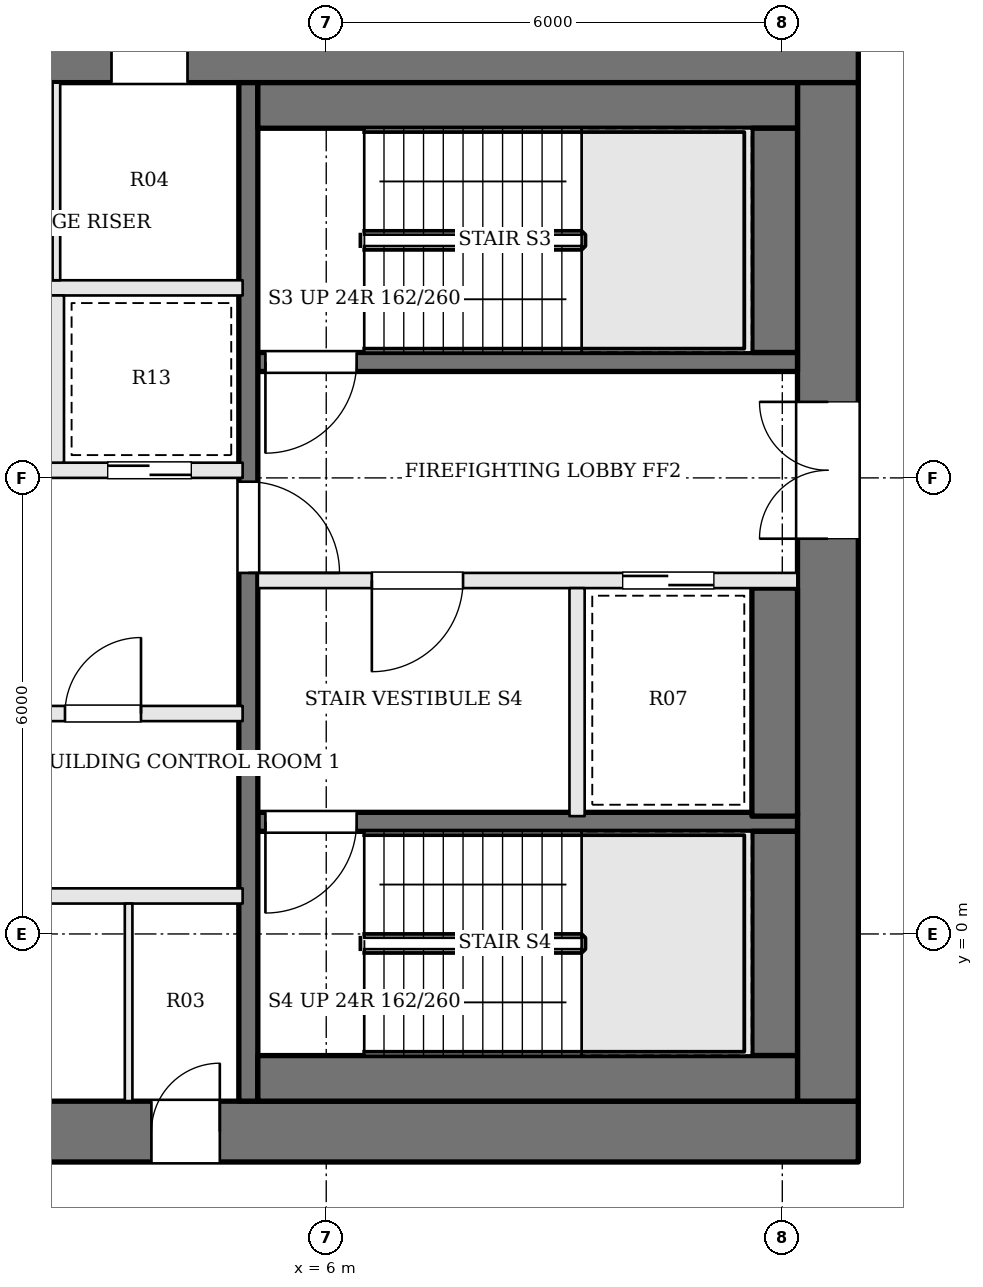
"""IFC4 building model, lengths in metres.
Left out: names, types, materials, properties, quantities, classifications, styles, units other than length and angle.
Written with IfcOpenShell. Run it as: python <this file> out.ifc"""

import sys

from ifc_helpers import new_model, si_unit, direction, frame, frame_2d, origin, place, context, subcontext, project, spatial, rectangle, extrude, element, fill, save


model = new_model("IFC4")
c1 = context("Model", 3, precision=1e-05, world=origin(), true_north=direction((0.0, 1.0)))
c2 = subcontext(c1, "Body", "Model", "MODEL_VIEW")
j1 = project(units=[si_unit("LENGTHUNIT", "METRE"), si_unit("PLANEANGLEUNIT", "RADIAN")], contexts=[c1])
p1 = place(None, origin())
s1 = spatial("IfcSite", under=j1, at=p1, CompositionType="ELEMENT")
p2 = place(p1, origin())
s2 = spatial("IfcBuilding", under=s1, at=p2, CompositionType="ELEMENT")
p3 = place(p2, frame((0.0, 0.0, 256.5)))
s3 = spatial("IfcBuildingStorey", under=s2, at=p3, CompositionType="ELEMENT", Elevation=256.5)
p4 = place(p3, frame((-13.0, 11.6, 0.0), z_axis=(0.0, 0.0, 1.0), x_axis=(1.0, 0.0, 0.0)))
e1 = element("IfcWall", 1, at=p4, inside=s3, PredefinedType="SHEAR", context=c2, shape_type="SweptSolid", body=[
    extrude(rectangle(XDim=26.0, YDim=0.8, at=frame_2d((13.0, 0.0))), origin(), (0.0, 0.0, 1.0), 3.9),
])
p5 = place(p4, frame((8.825, 0.0, 0.0)))
e2 = element("IfcOpeningElement", 2, at=p5, cuts=e1, PredefinedType="OPENING", context=c2, shape_type="SweptSolid", body=[
    extrude(rectangle(XDim=1.0, YDim=2.1, at=frame_2d((0.5, 1.05))), frame((0.0, 0.41, 0.0), z_axis=(0.0, -1.0, 0.0), x_axis=(1.0, 0.0, 0.0)), (0.0, 0.0, 1.0), 0.82),
])
p6 = place(p4, frame((11.825, 0.0, 0.0)))
e3 = element("IfcOpeningElement", 3, at=p6, cuts=e1, PredefinedType="OPENING", context=c2, shape_type="SweptSolid", body=[
    extrude(rectangle(XDim=0.7, YDim=2.1, at=frame_2d((0.35, 1.05))), frame((0.0, 0.41, 0.0), z_axis=(0.0, -1.0, 0.0), x_axis=(1.0, 0.0, 0.0)), (0.0, 0.0, 1.0), 0.82),
])
p7 = place(p4, frame((14.275, 0.0, 0.0)))
e4 = element("IfcOpeningElement", 4, at=p7, cuts=e1, PredefinedType="OPENING", context=c2, shape_type="SweptSolid", body=[
    extrude(rectangle(XDim=0.7, YDim=2.1, at=frame_2d((0.35, 1.05))), frame((0.0, 0.41, 0.0), z_axis=(0.0, -1.0, 0.0), x_axis=(1.0, 0.0, 0.0)), (0.0, 0.0, 1.0), 0.82),
])
p8 = place(p4, frame((16.175, 0.0, 0.0)))
e5 = element("IfcOpeningElement", 5, at=p8, cuts=e1, PredefinedType="OPENING", context=c2, shape_type="SweptSolid", body=[
    extrude(rectangle(XDim=1.0, YDim=2.1, at=frame_2d((0.5, 1.05))), frame((0.0, 0.41, 0.0), z_axis=(0.0, -1.0, 0.0), x_axis=(1.0, 0.0, 0.0)), (0.0, 0.0, 1.0), 0.82),
])
p9 = place(p3, frame((-13.0, -2.6, 0.0), z_axis=(0.0, 0.0, 1.0), x_axis=(1.0, 0.0, 0.0)))
e6 = element("IfcWall", 6, at=p9, inside=s3, PredefinedType="SHEAR", context=c2, shape_type="SweptSolid", body=[
    extrude(rectangle(XDim=26.0, YDim=0.8, at=frame_2d((13.0, 0.0))), origin(), (0.0, 0.0, 1.0), 3.9),
])
p10 = place(p9, frame((9.275, 0.0, 0.0)))
e7 = element("IfcOpeningElement", 7, at=p10, cuts=e6, PredefinedType="OPENING", context=c2, shape_type="SweptSolid", body=[
    extrude(rectangle(XDim=0.9, YDim=2.1, at=frame_2d((0.45, 1.05))), frame((0.0, 0.41, 0.0), z_axis=(0.0, -1.0, 0.0), x_axis=(1.0, 0.0, 0.0)), (0.0, 0.0, 1.0), 0.82),
])
p11 = place(p9, frame((11.75, 0.0, 0.0)))
e8 = element("IfcOpeningElement", 8, at=p11, cuts=e6, PredefinedType="OPENING", context=c2, shape_type="SweptSolid", body=[
    extrude(rectangle(XDim=1.0, YDim=2.1, at=frame_2d((0.5, 1.05))), frame((0.0, 0.41, 0.0), z_axis=(0.0, -1.0, 0.0), x_axis=(1.0, 0.0, 0.0)), (0.0, 0.0, 1.0), 0.82),
])
p12 = place(p9, frame((14.325, 0.0, 0.0)))
e9 = element("IfcOpeningElement", 9, at=p12, cuts=e6, PredefinedType="OPENING", context=c2, shape_type="SweptSolid", body=[
    extrude(rectangle(XDim=0.9, YDim=2.1, at=frame_2d((0.45, 1.05))), frame((0.0, 0.41, 0.0), z_axis=(0.0, -1.0, 0.0), x_axis=(1.0, 0.0, 0.0)), (0.0, 0.0, 1.0), 0.82),
])
p13 = place(p9, frame((16.7, 0.0, 0.0)))
e10 = element("IfcOpeningElement", 10, at=p13, cuts=e6, PredefinedType="OPENING", context=c2, shape_type="SweptSolid", body=[
    extrude(rectangle(XDim=0.9, YDim=2.1, at=frame_2d((0.45, 1.05))), frame((0.0, 0.41, 0.0), z_axis=(0.0, -1.0, 0.0), x_axis=(1.0, 0.0, 0.0)), (0.0, 0.0, 1.0), 0.82),
])
p14 = place(p3, frame((12.6, -2.2, 0.0), z_axis=(0.0, 0.0, 1.0), x_axis=(0.0, 1.0, 0.0)))
e11 = element("IfcWall", 11, at=p14, inside=s3, PredefinedType="SHEAR", context=c2, shape_type="SweptSolid", body=[
    extrude(rectangle(XDim=13.4, YDim=0.8, at=frame_2d((6.7, 0.0))), origin(), (0.0, 0.0, 1.0), 3.9),
])
p15 = place(p14, frame((7.4, 0.0, 0.0)))
e12 = element("IfcOpeningElement", 12, at=p15, cuts=e11, PredefinedType="OPENING", context=c2, shape_type="SweptSolid", body=[
    extrude(rectangle(XDim=1.8, YDim=2.1, at=frame_2d((0.9, 1.05))), frame((0.0, 0.41, 0.0), z_axis=(0.0, -1.0, 0.0), x_axis=(1.0, 0.0, 0.0)), (0.0, 0.0, 1.0), 0.82),
])
p16 = place(p3, frame((12.2, 7.525, 0.0), z_axis=(0.0, 0.0, 1.0), x_axis=(-1.0, 0.0, 0.0)))
e13 = element("IfcWall", 13, at=p16, inside=s3, PredefinedType="SOLIDWALL", context=c2, shape_type="SweptSolid", body=[
    extrude(rectangle(XDim=7.1, YDim=0.25, at=frame_2d((3.55, 0.0))), origin(), (0.0, 0.0, 1.0), 3.7),
])
p17 = place(p16, frame((5.8, 0.0, 0.0)))
e14 = element("IfcOpeningElement", 14, at=p17, cuts=e13, PredefinedType="OPENING", context=c2, shape_type="SweptSolid", body=[
    extrude(rectangle(XDim=1.2, YDim=2.1, at=frame_2d((0.6, 1.05))), frame((0.0, 0.135, 0.0), z_axis=(0.0, -1.0, 0.0), x_axis=(1.0, 0.0, 0.0)), (0.0, 0.0, 1.0), 0.27),
])
p18 = place(p3, frame((12.2, 4.65, 0.0), z_axis=(0.0, 0.0, 1.0), x_axis=(-1.0, 0.0, 0.0)))
e15 = element("IfcWall", 15, at=p18, inside=s3, PredefinedType="SOLIDWALL", context=c2, shape_type="SweptSolid", body=[
    extrude(rectangle(XDim=7.1, YDim=0.2, at=frame_2d((3.55, 0.0))), origin(), (0.0, 0.0, 1.0), 3.7),
])
p19 = place(p18, frame((4.4, 0.0, 0.0)))
e16 = element("IfcOpeningElement", 16, at=p19, cuts=e15, PredefinedType="OPENING", context=c2, shape_type="SweptSolid", body=[
    extrude(rectangle(XDim=1.2, YDim=2.1, at=frame_2d((0.6, 1.05))), frame((0.0, 0.11, 0.0), z_axis=(0.0, -1.0, 0.0), x_axis=(1.0, 0.0, 0.0)), (0.0, 0.0, 1.0), 0.22),
])
p20 = place(p18, frame((1.1, 0.0, 0.0)))
e17 = element("IfcOpeningElement", 17, at=p20, cuts=e15, PredefinedType="OPENING", context=c2, shape_type="SweptSolid", body=[
    extrude(rectangle(XDim=1.2, YDim=2.1, at=frame_2d((0.6, 1.05))), frame((0.0, 0.11, 0.0), z_axis=(0.0, -1.0, 0.0), x_axis=(1.0, 0.0, 0.0)), (0.0, 0.0, 1.0), 0.22),
])
p21 = place(p3, frame((12.2, 1.475, 0.0), z_axis=(0.0, 0.0, 1.0), x_axis=(-1.0, 0.0, 0.0)))
e18 = element("IfcWall", 18, at=p21, inside=s3, PredefinedType="SOLIDWALL", context=c2, shape_type="SweptSolid", body=[
    extrude(rectangle(XDim=7.1, YDim=0.25, at=frame_2d((3.55, 0.0))), origin(), (0.0, 0.0, 1.0), 3.7),
])
p22 = place(p21, frame((5.8, 0.0, 0.0)))
e19 = element("IfcOpeningElement", 19, at=p22, cuts=e18, PredefinedType="OPENING", context=c2, shape_type="SweptSolid", body=[
    extrude(rectangle(XDim=1.2, YDim=2.1, at=frame_2d((0.6, 1.05))), frame((0.0, 0.135, 0.0), z_axis=(0.0, -1.0, 0.0), x_axis=(1.0, 0.0, 0.0)), (0.0, 0.0, 1.0), 0.27),
])
p23 = place(p3, frame((9.3, 4.55, 0.0), z_axis=(0.0, 0.0, 1.0), x_axis=(0.0, -1.0, 0.0)))
e20 = element("IfcWall", 20, at=p23, inside=s3, PredefinedType="SOLIDWALL", context=c2, shape_type="SweptSolid", body=[
    extrude(rectangle(XDim=3.0, YDim=0.2, at=frame_2d((1.5, 0.0))), origin(), (0.0, 0.0, 1.0), 3.7),
])
p24 = place(p3, frame((4.975, 11.2, 0.0), z_axis=(0.0, 0.0, 1.0), x_axis=(0.0, -1.0, 0.0)))
e21 = element("IfcWall", 21, at=p24, inside=s3, PredefinedType="SOLIDWALL", context=c2, shape_type="SweptSolid", body=[
    extrude(rectangle(XDim=13.4, YDim=0.25, at=frame_2d((6.7, 0.0))), origin(), (0.0, 0.0, 1.0), 3.7),
])
p25 = place(p24, frame((5.25, 0.0, 0.0)))
e22 = element("IfcOpeningElement", 22, at=p25, cuts=e21, PredefinedType="OPENING", context=c2, shape_type="SweptSolid", body=[
    extrude(rectangle(XDim=1.2, YDim=2.1, at=frame_2d((0.6, 1.05))), frame((0.0, 0.135, 0.0), z_axis=(0.0, -1.0, 0.0), x_axis=(1.0, 0.0, 0.0)), (0.0, 0.0, 1.0), 0.27),
])
p26 = place(p3, frame((12.2, 10.9, 0.0), z_axis=(0.0, 0.0, 1.0), x_axis=(-1.0, 0.0, 0.0)))
e23 = element("IfcWall", 23, at=p26, inside=s3, PredefinedType="SOLIDWALL", context=c2, shape_type="SweptSolid", body=[
    extrude(rectangle(XDim=7.1, YDim=0.6, at=frame_2d((3.55, 0.0))), origin(), (0.0, 0.0, 1.0), 3.7),
])
p27 = place(p3, frame((11.9, 10.6, 0.0), z_axis=(0.0, 0.0, 1.0), x_axis=(0.0, -1.0, 0.0)))
e24 = element("IfcWall", 24, at=p27, inside=s3, PredefinedType="SOLIDWALL", context=c2, shape_type="SweptSolid", body=[
    extrude(rectangle(XDim=2.95, YDim=0.6, at=frame_2d((1.475, 0.0))), origin(), (0.0, 0.0, 1.0), 3.7),
])
p28 = place(p3, frame((11.9, 4.55, 0.0), z_axis=(0.0, 0.0, 1.0), x_axis=(0.0, -1.0, 0.0)))
e25 = element("IfcWall", 25, at=p28, inside=s3, PredefinedType="SOLIDWALL", context=c2, shape_type="SweptSolid", body=[
    extrude(rectangle(XDim=3.0, YDim=0.6, at=frame_2d((1.5, 0.0))), origin(), (0.0, 0.0, 1.0), 3.7),
])
p29 = place(p3, frame((11.9, 1.35, 0.0), z_axis=(0.0, 0.0, 1.0), x_axis=(0.0, -1.0, 0.0)))
e26 = element("IfcWall", 26, at=p29, inside=s3, PredefinedType="SOLIDWALL", context=c2, shape_type="SweptSolid", body=[
    extrude(rectangle(XDim=2.95, YDim=0.6, at=frame_2d((1.475, 0.0))), origin(), (0.0, 0.0, 1.0), 3.7),
])
p30 = place(p3, frame((12.2, -1.9, 0.0), z_axis=(0.0, 0.0, 1.0), x_axis=(-1.0, 0.0, 0.0)))
e27 = element("IfcWall", 27, at=p30, inside=s3, PredefinedType="SOLIDWALL", context=c2, shape_type="SweptSolid", body=[
    extrude(rectangle(XDim=7.1, YDim=0.6, at=frame_2d((3.55, 0.0))), origin(), (0.0, 0.0, 1.0), 3.7),
])
p31 = place(p3, frame((-4.9, 0.5, 0.0), z_axis=(0.0, 0.0, 1.0), x_axis=(1.0, 0.0, 0.0)))
e28 = element("IfcWall", 28, at=p31, inside=s3, PredefinedType="SOLIDWALL", context=c2, shape_type="SweptSolid", body=[
    extrude(rectangle(XDim=9.8, YDim=0.2, at=frame_2d((4.9, 0.0))), origin(), (0.0, 0.0, 1.0), 3.7),
])
p32 = place(p3, frame((-4.9, 2.9, 0.0), z_axis=(0.0, 0.0, 1.0), x_axis=(1.0, 0.0, 0.0)))
e29 = element("IfcWall", 29, at=p32, inside=s3, PredefinedType="SOLIDWALL", context=c2, shape_type="SweptSolid", body=[
    extrude(rectangle(XDim=9.8, YDim=0.2, at=frame_2d((4.9, 0.0))), origin(), (0.0, 0.0, 1.0), 3.7),
])
p33 = place(p32, frame((0.675, 0.0, 0.0)))
e30 = element("IfcOpeningElement", 30, at=p33, cuts=e29, PredefinedType="OPENING", context=c2, shape_type="SweptSolid", body=[
    extrude(rectangle(XDim=1.1, YDim=2.1, at=frame_2d((0.55, 1.05))), frame((0.0, 0.11, 0.0), z_axis=(0.0, -1.0, 0.0), x_axis=(1.0, 0.0, 0.0)), (0.0, 0.0, 1.0), 0.22),
])
p34 = place(p32, frame((2.613, 0.0, 0.0)))
e31 = element("IfcOpeningElement", 31, at=p34, cuts=e29, PredefinedType="OPENING", context=c2, shape_type="SweptSolid", body=[
    extrude(rectangle(XDim=0.9, YDim=2.1, at=frame_2d((0.45, 1.05))), frame((0.0, 0.11, 0.0), z_axis=(0.0, -1.0, 0.0), x_axis=(1.0, 0.0, 0.0)), (0.0, 0.0, 1.0), 0.22),
])
p35 = place(p32, frame((4.35, 0.0, 0.0)))
e32 = element("IfcOpeningElement", 32, at=p35, cuts=e29, PredefinedType="OPENING", context=c2, shape_type="SweptSolid", body=[
    extrude(rectangle(XDim=1.1, YDim=2.1, at=frame_2d((0.55, 1.05))), frame((0.0, 0.11, 0.0), z_axis=(0.0, -1.0, 0.0), x_axis=(1.0, 0.0, 0.0)), (0.0, 0.0, 1.0), 0.22),
])
p36 = place(p32, frame((7.463, 0.0, 0.0)))
e33 = element("IfcOpeningElement", 33, at=p36, cuts=e29, PredefinedType="OPENING", context=c2, shape_type="SweptSolid", body=[
    extrude(rectangle(XDim=1.0, YDim=2.1, at=frame_2d((0.5, 1.05))), frame((0.0, 0.11, 0.0), z_axis=(0.0, -1.0, 0.0), x_axis=(1.0, 0.0, 0.0)), (0.0, 0.0, 1.0), 0.22),
])
p37 = place(p3, frame((-4.9, 6.1, 0.0), z_axis=(0.0, 0.0, 1.0), x_axis=(1.0, 0.0, 0.0)))
e34 = element("IfcWall", 34, at=p37, inside=s3, PredefinedType="SOLIDWALL", context=c2, shape_type="SweptSolid", body=[
    extrude(rectangle(XDim=9.8, YDim=0.2, at=frame_2d((4.9, 0.0))), origin(), (0.0, 0.0, 1.0), 3.7),
])
p38 = place(p37, frame((0.675, 0.0, 0.0)))
e35 = element("IfcOpeningElement", 35, at=p38, cuts=e34, PredefinedType="OPENING", context=c2, shape_type="SweptSolid", body=[
    extrude(rectangle(XDim=1.1, YDim=2.1, at=frame_2d((0.55, 1.05))), frame((0.0, 0.11, 0.0), z_axis=(0.0, -1.0, 0.0), x_axis=(1.0, 0.0, 0.0)), (0.0, 0.0, 1.0), 0.22),
])
p39 = place(p37, frame((3.125, 0.0, 0.0)))
e36 = element("IfcOpeningElement", 36, at=p39, cuts=e34, PredefinedType="OPENING", context=c2, shape_type="SweptSolid", body=[
    extrude(rectangle(XDim=1.1, YDim=2.1, at=frame_2d((0.55, 1.05))), frame((0.0, 0.11, 0.0), z_axis=(0.0, -1.0, 0.0), x_axis=(1.0, 0.0, 0.0)), (0.0, 0.0, 1.0), 0.22),
])
p40 = place(p37, frame((5.575, 0.0, 0.0)))
e37 = element("IfcOpeningElement", 37, at=p40, cuts=e34, PredefinedType="OPENING", context=c2, shape_type="SweptSolid", body=[
    extrude(rectangle(XDim=1.1, YDim=2.1, at=frame_2d((0.55, 1.05))), frame((0.0, 0.11, 0.0), z_axis=(0.0, -1.0, 0.0), x_axis=(1.0, 0.0, 0.0)), (0.0, 0.0, 1.0), 0.22),
])
p41 = place(p37, frame((8.025, 0.0, 0.0)))
e38 = element("IfcOpeningElement", 38, at=p41, cuts=e34, PredefinedType="OPENING", context=c2, shape_type="SweptSolid", body=[
    extrude(rectangle(XDim=1.1, YDim=2.1, at=frame_2d((0.55, 1.05))), frame((0.0, 0.11, 0.0), z_axis=(0.0, -1.0, 0.0), x_axis=(1.0, 0.0, 0.0)), (0.0, 0.0, 1.0), 0.22),
])
p42 = place(p3, frame((-4.9, 8.5, 0.0), z_axis=(0.0, 0.0, 1.0), x_axis=(1.0, 0.0, 0.0)))
e39 = element("IfcWall", 39, at=p42, inside=s3, PredefinedType="SOLIDWALL", context=c2, shape_type="SweptSolid", body=[
    extrude(rectangle(XDim=9.8, YDim=0.2, at=frame_2d((4.9, 0.0))), origin(), (0.0, 0.0, 1.0), 3.7),
])
p43 = place(p3, frame((2.45, 6.2, 0.0), z_axis=(0.0, 0.0, 1.0), x_axis=(0.0, 1.0, 0.0)))
e40 = element("IfcWall", 40, at=p43, inside=s3, PredefinedType="SOLIDWALL", context=c2, shape_type="SweptSolid", body=[
    extrude(rectangle(XDim=2.2, YDim=0.2, at=frame_2d((1.1, 0.0))), origin(), (0.0, 0.0, 1.0), 3.7),
])
for number, where, z_axis, x_axis in (
    (41, (3.4, -2.2, 0.0), (0.0, 0.0, 1.0), (0.0, 1.0, 0.0)),
    (42, (2.45, 8.6, 0.0), (0.0, 0.0, 1.0), (0.0, 1.0, 0.0)),
):
    element("IfcWall", number, at=place(p3, frame(where, z_axis=z_axis, x_axis=x_axis)), inside=s3, PredefinedType="PARTITIONING", context=c2, shape_type="SweptSolid", body=[
        extrude(rectangle(XDim=2.6, YDim=0.1, at=frame_2d((1.3, 0.0))), origin(), (0.0, 0.0, 1.0), 3.7),
    ])
p44 = place(p15, origin())
e43 = element("IfcDoor", 43, at=p44, inside=s3, OperationType="DOUBLE_DOOR_SINGLE_SWING", PredefinedType="DOOR", context=c2, shape_type="SweptSolid", body=[
    extrude(rectangle(XDim=1.8, YDim=2.1, at=frame_2d((0.9, 1.05))), frame((0.0, 0.025, 0.0), z_axis=(0.0, -1.0, 0.0), x_axis=(1.0, 0.0, 0.0)), (0.0, 0.0, 1.0), 0.05),
])
fill(e12, e43)
p45 = place(p25, origin())
e44 = element("IfcDoor", 44, at=p45, inside=s3, OperationType="SINGLE_SWING_RIGHT", PredefinedType="DOOR", context=c2, shape_type="SweptSolid", body=[
    extrude(rectangle(XDim=1.2, YDim=2.1, at=frame_2d((0.6, 1.05))), frame((0.0, 0.025, 0.0), z_axis=(0.0, -1.0, 0.0), x_axis=(1.0, 0.0, 0.0)), (0.0, 0.0, 1.0), 0.05),
])
fill(e22, e44)
p46 = place(p19, origin())
e45 = element("IfcDoor", 45, at=p46, inside=s3, OperationType="SINGLE_SWING_RIGHT", PredefinedType="DOOR", context=c2, shape_type="SweptSolid", body=[
    extrude(rectangle(XDim=1.2, YDim=2.1, at=frame_2d((0.6, 1.05))), frame((0.0, 0.025, 0.0), z_axis=(0.0, -1.0, 0.0), x_axis=(1.0, 0.0, 0.0)), (0.0, 0.0, 1.0), 0.05),
])
fill(e16, e45)
p47 = place(p17, origin())
e46 = element("IfcDoor", 46, at=p47, inside=s3, OperationType="SINGLE_SWING_RIGHT", PredefinedType="DOOR", context=c2, shape_type="SweptSolid", body=[
    extrude(rectangle(XDim=1.2, YDim=2.1, at=frame_2d((0.6, 1.05))), frame((0.0, 0.025, 0.0), z_axis=(0.0, -1.0, 0.0), x_axis=(1.0, 0.0, 0.0)), (0.0, 0.0, 1.0), 0.05),
])
fill(e14, e46)
p48 = place(p22, origin())
e47 = element("IfcDoor", 47, at=p48, inside=s3, OperationType="SINGLE_SWING_RIGHT", PredefinedType="DOOR", context=c2, shape_type="SweptSolid", body=[
    extrude(rectangle(XDim=1.2, YDim=2.1, at=frame_2d((0.6, 1.05))), frame((0.0, 0.025, 0.0), z_axis=(0.0, -1.0, 0.0), x_axis=(1.0, 0.0, 0.0)), (0.0, 0.0, 1.0), 0.05),
])
fill(e19, e47)
p49 = place(p20, origin())
e48 = element("IfcDoor", 48, at=p49, inside=s3, OperationType="SLIDING_TO_RIGHT", PredefinedType="DOOR", context=c2, shape_type="SweptSolid", body=[
    extrude(rectangle(XDim=1.2, YDim=2.1, at=frame_2d((0.6, 1.05))), frame((0.0, 0.025, 0.0), z_axis=(0.0, -1.0, 0.0), x_axis=(1.0, 0.0, 0.0)), (0.0, 0.0, 1.0), 0.05),
])
fill(e17, e48)
p50 = place(p36, origin())
e49 = element("IfcDoor", 49, at=p50, inside=s3, OperationType="SINGLE_SWING_RIGHT", PredefinedType="DOOR", context=c2, shape_type="SweptSolid", body=[
    extrude(rectangle(XDim=1.0, YDim=2.1, at=frame_2d((0.5, 1.05))), frame((0.0, 0.025, 0.0), z_axis=(0.0, -1.0, 0.0), x_axis=(1.0, 0.0, 0.0)), (0.0, 0.0, 1.0), 0.05),
])
fill(e33, e49)
p51 = place(p41, origin())
e50 = element("IfcDoor", 50, at=p51, inside=s3, OperationType="SLIDING_TO_LEFT", PredefinedType="DOOR", context=c2, shape_type="SweptSolid", body=[
    extrude(rectangle(XDim=1.1, YDim=2.1, at=frame_2d((0.55, 1.05))), frame((0.0, 0.025, 0.0), z_axis=(0.0, -1.0, 0.0), x_axis=(1.0, 0.0, 0.0)), (0.0, 0.0, 1.0), 0.05),
])
fill(e38, e50)
p52 = place(p13, origin())
e51 = element("IfcDoor", 51, at=p52, inside=s3, OperationType="SINGLE_SWING_RIGHT", PredefinedType="DOOR", context=c2, shape_type="SweptSolid", body=[
    extrude(rectangle(XDim=0.9, YDim=2.1, at=frame_2d((0.45, 1.05))), frame((0.0, 0.025, 0.0), z_axis=(0.0, -1.0, 0.0), x_axis=(1.0, 0.0, 0.0)), (0.0, 0.0, 1.0), 0.05),
])
fill(e10, e51)
p53 = place(p8, origin())
e52 = element("IfcDoor", 52, at=p53, inside=s3, OperationType="SINGLE_SWING_RIGHT", PredefinedType="DOOR", context=c2, shape_type="SweptSolid", body=[
    extrude(rectangle(XDim=1.0, YDim=2.1, at=frame_2d((0.5, 1.05))), frame((0.0, 0.025, 0.0), z_axis=(0.0, -1.0, 0.0), x_axis=(1.0, 0.0, 0.0)), (0.0, 0.0, 1.0), 0.05),
])
fill(e5, e52)
save(model, sys.argv[1])
